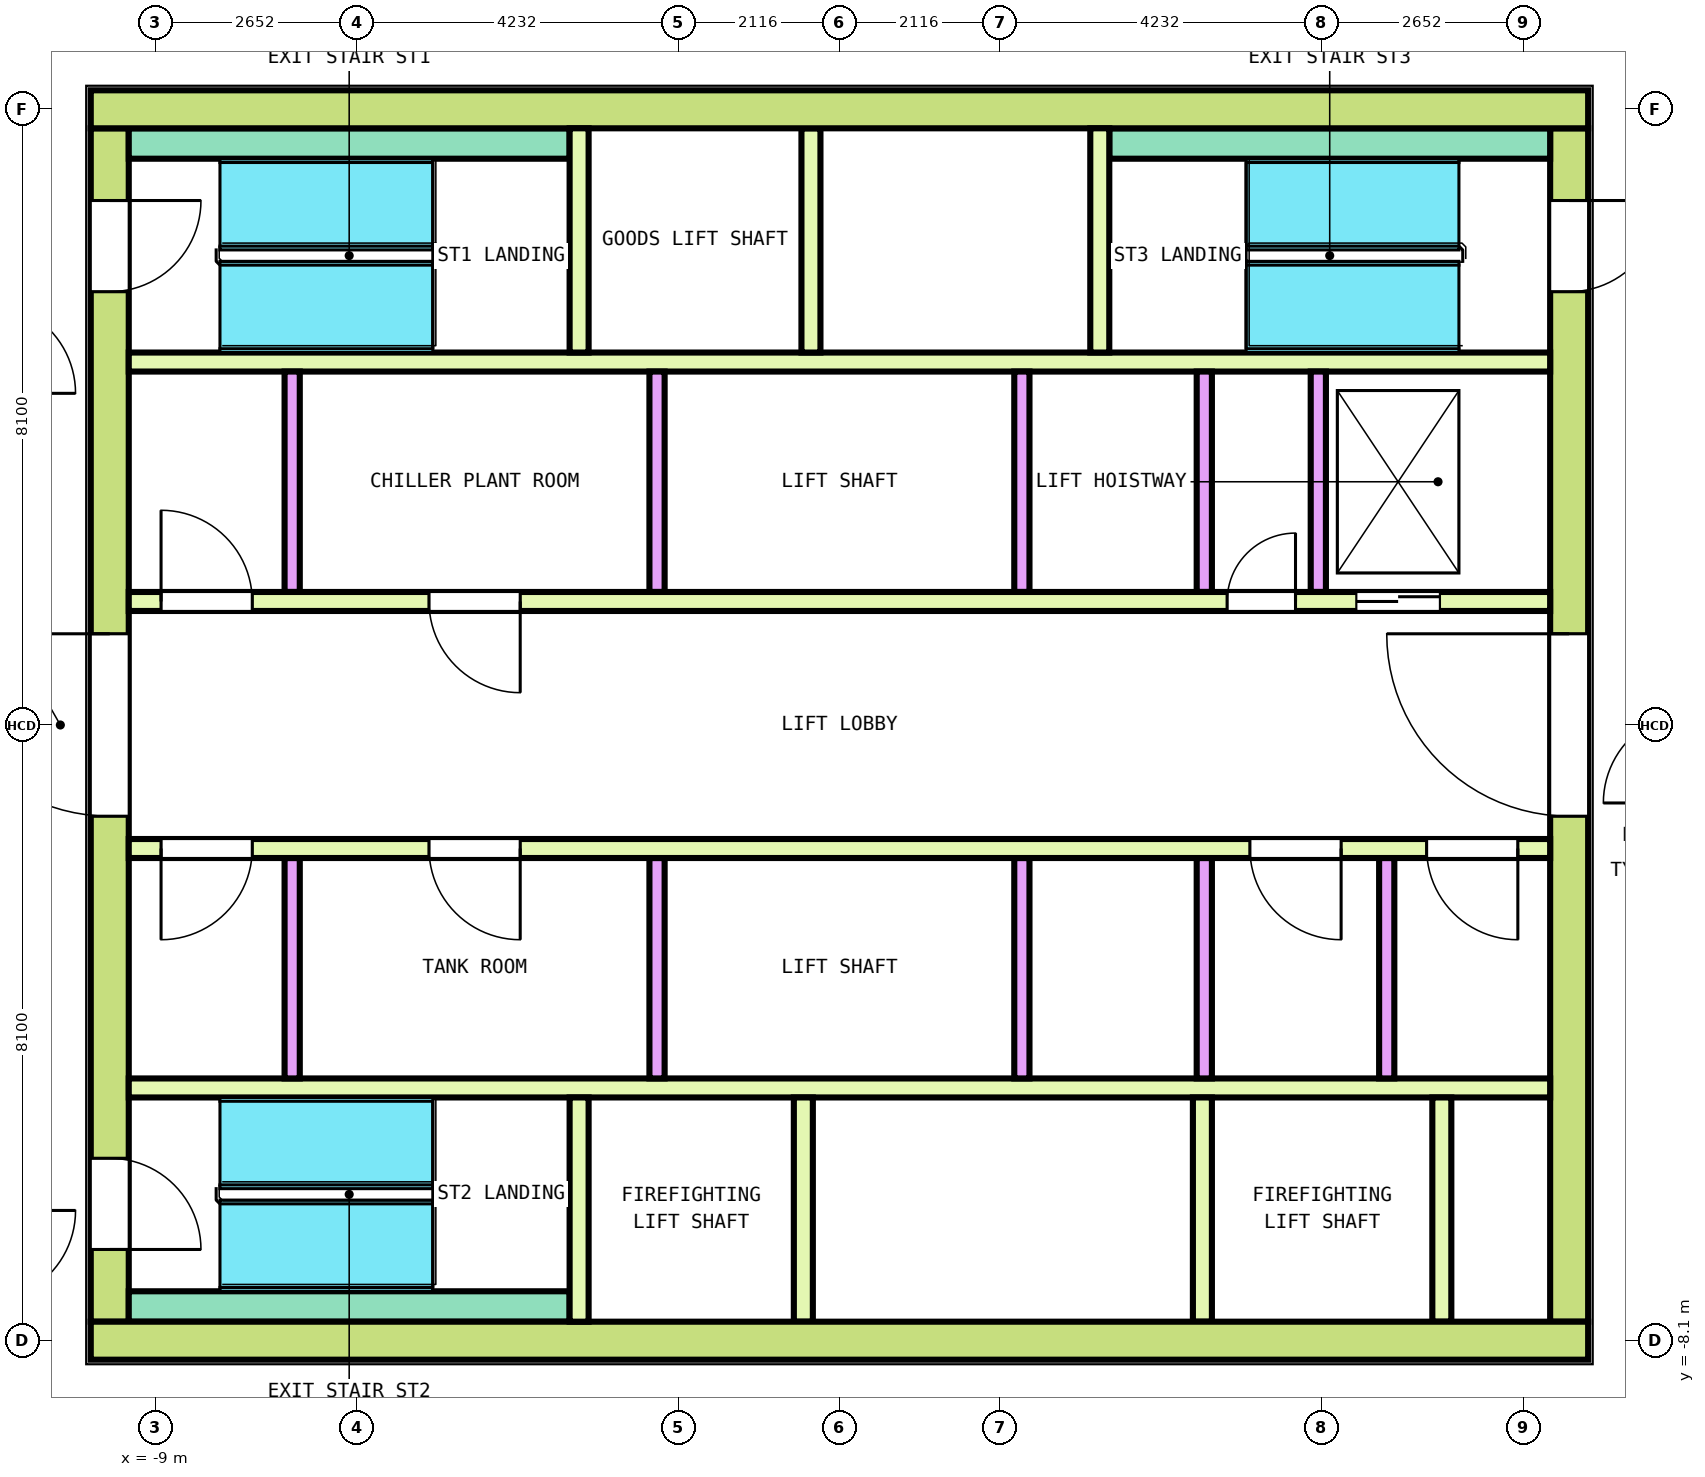
"""IFC4 building model, lengths in metres.
Left out: names, types, materials, properties, quantities, classifications, styles, units other than length and angle.
Written with IfcOpenShell. Run it as: python <this file> out.ifc"""

import sys

from ifc_helpers import new_model, si_unit, direction, frame, frame_2d, origin, place, context, subcontext, project, spatial, rectangle, extrude, element, fill, save


model = new_model("IFC4")
c1 = context("Model", 3, precision=1e-05, world=origin(), true_north=direction((0.0, 1.0)))
c2 = subcontext(c1, "Body", "Model", "MODEL_VIEW")
j1 = project(units=[si_unit("LENGTHUNIT", "METRE"), si_unit("PLANEANGLEUNIT", "RADIAN")], contexts=[c1])
p1 = place(None, origin())
s1 = spatial("IfcSite", under=j1, at=p1, CompositionType="ELEMENT")
p2 = place(p1, origin())
s2 = spatial("IfcBuilding", under=s1, at=p2, CompositionType="ELEMENT")
p3 = place(p2, frame((0.0, 0.0, 344.6)))
s3 = spatial("IfcBuildingStorey", under=s2, at=p3, CompositionType="ELEMENT", Elevation=344.6)
for number, where, z_axis, x_axis in (
    (1, (-9.85, 8.1, 0.0), (0.0, 0.0, 1.0), (1.0, 0.0, 0.0)),
    (2, (-9.85, -8.1, 0.0), (0.0, 0.0, 1.0), (1.0, 0.0, 0.0)),
):
    element("IfcWall", number, at=place(p3, frame(where, z_axis=z_axis, x_axis=x_axis)), inside=s3, PredefinedType="SHEAR", context=c2, shape_type="SweptSolid", body=[
        extrude(rectangle(XDim=19.7, YDim=0.5, at=frame_2d((9.85, 0.0))), origin(), (0.0, 0.0, 1.0), 3.8),
    ])
p4 = place(p3, frame((-9.6, -7.85, 0.0), z_axis=(0.0, 0.0, 1.0), x_axis=(0.0, 1.0, 0.0)))
e3 = element("IfcWall", 3, at=p4, inside=s3, PredefinedType="SHEAR", context=c2, shape_type="SweptSolid", body=[
    extrude(rectangle(XDim=15.7, YDim=0.5, at=frame_2d((7.85, 0.0))), origin(), (0.0, 0.0, 1.0), 3.8),
])
p5 = place(p4, frame((6.65, 0.0, 0.0)))
e4 = element("IfcOpeningElement", 4, at=p5, cuts=e3, PredefinedType="OPENING", context=c2, shape_type="SweptSolid", body=[
    extrude(rectangle(XDim=2.4, YDim=2.1, at=frame_2d((1.2, 1.05))), frame((0.0, 0.26, 0.0), z_axis=(0.0, -1.0, 0.0), x_axis=(1.0, 0.0, 0.0)), (0.0, 0.0, 1.0), 0.52),
])
p6 = place(p4, frame((13.55, 0.0, 0.0)))
e5 = element("IfcOpeningElement", 5, at=p6, cuts=e3, PredefinedType="OPENING", context=c2, shape_type="SweptSolid", body=[
    extrude(rectangle(XDim=1.2, YDim=2.1, at=frame_2d((0.6, 1.05))), frame((0.0, 0.26, 0.0), z_axis=(0.0, -1.0, 0.0), x_axis=(1.0, 0.0, 0.0)), (0.0, 0.0, 1.0), 0.52),
])
p7 = place(p4, frame((0.95, 0.0, 0.0)))
e6 = element("IfcOpeningElement", 6, at=p7, cuts=e3, PredefinedType="OPENING", context=c2, shape_type="SweptSolid", body=[
    extrude(rectangle(XDim=1.2, YDim=2.1, at=frame_2d((0.6, 1.05))), frame((0.0, 0.26, 0.0), z_axis=(0.0, -1.0, 0.0), x_axis=(1.0, 0.0, 0.0)), (0.0, 0.0, 1.0), 0.52),
])
p8 = place(p3, frame((9.6, -7.85, 0.0), z_axis=(0.0, 0.0, 1.0), x_axis=(0.0, 1.0, 0.0)))
e7 = element("IfcWall", 7, at=p8, inside=s3, PredefinedType="SHEAR", context=c2, shape_type="SweptSolid", body=[
    extrude(rectangle(XDim=15.7, YDim=0.5, at=frame_2d((7.85, 0.0))), origin(), (0.0, 0.0, 1.0), 3.8),
])
p9 = place(p8, frame((6.65, 0.0, 0.0)))
e8 = element("IfcOpeningElement", 8, at=p9, cuts=e7, PredefinedType="OPENING", context=c2, shape_type="SweptSolid", body=[
    extrude(rectangle(XDim=2.4, YDim=2.1, at=frame_2d((1.2, 1.05))), frame((0.0, 0.26, 0.0), z_axis=(0.0, -1.0, 0.0), x_axis=(1.0, 0.0, 0.0)), (0.0, 0.0, 1.0), 0.52),
])
p10 = place(p8, frame((13.55, 0.0, 0.0)))
e9 = element("IfcOpeningElement", 9, at=p10, cuts=e7, PredefinedType="OPENING", context=c2, shape_type="SweptSolid", body=[
    extrude(rectangle(XDim=1.2, YDim=2.1, at=frame_2d((0.6, 1.05))), frame((0.0, 0.26, 0.0), z_axis=(0.0, -1.0, 0.0), x_axis=(1.0, 0.0, 0.0)), (0.0, 0.0, 1.0), 0.52),
])
p11 = place(p3, frame((-9.35, 1.625, 0.0), z_axis=(0.0, 0.0, 1.0), x_axis=(1.0, 0.0, 0.0)))
e10 = element("IfcWall", 10, at=p11, inside=s3, PredefinedType="SOLIDWALL", context=c2, shape_type="SweptSolid", body=[
    extrude(rectangle(XDim=18.7, YDim=0.25, at=frame_2d((9.35, 0.0))), origin(), (0.0, 0.0, 1.0), 3.8),
])
p12 = place(p11, frame((16.15, 0.0, 0.0)))
e11 = element("IfcOpeningElement", 11, at=p12, cuts=e10, PredefinedType="OPENING", context=c2, shape_type="SweptSolid", body=[
    extrude(rectangle(XDim=1.1, YDim=2.1, at=frame_2d((0.55, 1.05))), frame((0.0, 0.135, 0.0), z_axis=(0.0, -1.0, 0.0), x_axis=(1.0, 0.0, 0.0)), (0.0, 0.0, 1.0), 0.27),
])
p13 = place(p11, frame((0.425, 0.0, 0.0)))
e12 = element("IfcOpeningElement", 12, at=p13, cuts=e10, PredefinedType="OPENING", context=c2, shape_type="SweptSolid", body=[
    extrude(rectangle(XDim=1.2, YDim=2.1, at=frame_2d((0.6, 1.05))), frame((0.0, 0.135, 0.0), z_axis=(0.0, -1.0, 0.0), x_axis=(1.0, 0.0, 0.0)), (0.0, 0.0, 1.0), 0.27),
])
p14 = place(p11, frame((3.95, 0.0, 0.0)))
e13 = element("IfcOpeningElement", 13, at=p14, cuts=e10, PredefinedType="OPENING", context=c2, shape_type="SweptSolid", body=[
    extrude(rectangle(XDim=1.2, YDim=2.1, at=frame_2d((0.6, 1.05))), frame((0.0, 0.135, 0.0), z_axis=(0.0, -1.0, 0.0), x_axis=(1.0, 0.0, 0.0)), (0.0, 0.0, 1.0), 0.27),
])
p15 = place(p11, frame((14.45, 0.0, 0.0)))
e14 = element("IfcOpeningElement", 14, at=p15, cuts=e10, PredefinedType="OPENING", context=c2, shape_type="SweptSolid", body=[
    extrude(rectangle(XDim=0.9, YDim=2.1, at=frame_2d((0.45, 1.05))), frame((0.0, 0.135, 0.0), z_axis=(0.0, -1.0, 0.0), x_axis=(1.0, 0.0, 0.0)), (0.0, 0.0, 1.0), 0.27),
])
p16 = place(p3, frame((-9.35, 4.775, 0.0), z_axis=(0.0, 0.0, 1.0), x_axis=(1.0, 0.0, 0.0)))
e15 = element("IfcWall", 15, at=p16, inside=s3, PredefinedType="SOLIDWALL", context=c2, shape_type="SweptSolid", body=[
    extrude(rectangle(XDim=18.7, YDim=0.25, at=frame_2d((9.35, 0.0))), origin(), (0.0, 0.0, 1.0), 3.8),
])
for number, where, z_axis, x_axis in (
    (16, (-7.2, 1.75, 0.0), (0.0, 0.0, 1.0), (0.0, 1.0, 0.0)),
    (17, (-2.4, 1.75, 0.0), (0.0, 0.0, 1.0), (0.0, 1.0, 0.0)),
    (18, (2.4, 1.75, 0.0), (0.0, 0.0, 1.0), (0.0, 1.0, 0.0)),
    (19, (4.8, 1.75, 0.0), (0.0, 0.0, 1.0), (0.0, 1.0, 0.0)),
    (20, (6.3, 1.75, 0.0), (0.0, 0.0, 1.0), (0.0, 1.0, 0.0)),
):
    element("IfcWall", number, at=place(p3, frame(where, z_axis=z_axis, x_axis=x_axis)), inside=s3, PredefinedType="SOLIDWALL", context=c2, shape_type="SweptSolid", body=[
        extrude(rectangle(XDim=2.9, YDim=0.2, at=frame_2d((1.45, 0.0))), origin(), (0.0, 0.0, 1.0), 3.8),
    ])
p17 = place(p3, frame((-9.35, -1.625, 0.0), z_axis=(0.0, 0.0, 1.0), x_axis=(1.0, 0.0, 0.0)))
e21 = element("IfcWall", 21, at=p17, inside=s3, PredefinedType="SOLIDWALL", context=c2, shape_type="SweptSolid", body=[
    extrude(rectangle(XDim=18.7, YDim=0.25, at=frame_2d((9.35, 0.0))), origin(), (0.0, 0.0, 1.0), 3.8),
])
p18 = place(p17, frame((0.425, 0.0, 0.0)))
e22 = element("IfcOpeningElement", 22, at=p18, cuts=e21, PredefinedType="OPENING", context=c2, shape_type="SweptSolid", body=[
    extrude(rectangle(XDim=1.2, YDim=2.1, at=frame_2d((0.6, 1.05))), frame((0.0, 0.135, 0.0), z_axis=(0.0, -1.0, 0.0), x_axis=(1.0, 0.0, 0.0)), (0.0, 0.0, 1.0), 0.27),
])
p19 = place(p17, frame((3.95, 0.0, 0.0)))
e23 = element("IfcOpeningElement", 23, at=p19, cuts=e21, PredefinedType="OPENING", context=c2, shape_type="SweptSolid", body=[
    extrude(rectangle(XDim=1.2, YDim=2.1, at=frame_2d((0.6, 1.05))), frame((0.0, 0.135, 0.0), z_axis=(0.0, -1.0, 0.0), x_axis=(1.0, 0.0, 0.0)), (0.0, 0.0, 1.0), 0.27),
])
p20 = place(p17, frame((14.75, 0.0, 0.0)))
e24 = element("IfcOpeningElement", 24, at=p20, cuts=e21, PredefinedType="OPENING", context=c2, shape_type="SweptSolid", body=[
    extrude(rectangle(XDim=1.2, YDim=2.1, at=frame_2d((0.6, 1.05))), frame((0.0, 0.135, 0.0), z_axis=(0.0, -1.0, 0.0), x_axis=(1.0, 0.0, 0.0)), (0.0, 0.0, 1.0), 0.27),
])
p21 = place(p17, frame((17.075, 0.0, 0.0)))
e25 = element("IfcOpeningElement", 25, at=p21, cuts=e21, PredefinedType="OPENING", context=c2, shape_type="SweptSolid", body=[
    extrude(rectangle(XDim=1.2, YDim=2.1, at=frame_2d((0.6, 1.05))), frame((0.0, 0.135, 0.0), z_axis=(0.0, -1.0, 0.0), x_axis=(1.0, 0.0, 0.0)), (0.0, 0.0, 1.0), 0.27),
])
p22 = place(p3, frame((-9.35, -4.775, 0.0), z_axis=(0.0, 0.0, 1.0), x_axis=(1.0, 0.0, 0.0)))
e26 = element("IfcWall", 26, at=p22, inside=s3, PredefinedType="SOLIDWALL", context=c2, shape_type="SweptSolid", body=[
    extrude(rectangle(XDim=18.7, YDim=0.25, at=frame_2d((9.35, 0.0))), origin(), (0.0, 0.0, 1.0), 3.8),
])
for number, where, z_axis, x_axis in (
    (27, (-7.2, -4.65, 0.0), (0.0, 0.0, 1.0), (0.0, 1.0, 0.0)),
    (28, (-2.4, -4.65, 0.0), (0.0, 0.0, 1.0), (0.0, 1.0, 0.0)),
    (29, (2.4, -4.65, 0.0), (0.0, 0.0, 1.0), (0.0, 1.0, 0.0)),
    (30, (4.8, -4.65, 0.0), (0.0, 0.0, 1.0), (0.0, 1.0, 0.0)),
    (31, (7.2, -4.65, 0.0), (0.0, 0.0, 1.0), (0.0, 1.0, 0.0)),
):
    element("IfcWall", number, at=place(p3, frame(where, z_axis=z_axis, x_axis=x_axis)), inside=s3, PredefinedType="SOLIDWALL", context=c2, shape_type="SweptSolid", body=[
        extrude(rectangle(XDim=2.9, YDim=0.2, at=frame_2d((1.45, 0.0))), origin(), (0.0, 0.0, 1.0), 3.8),
    ])
for number, where, z_axis, x_axis in (
    (32, (-9.35, 7.65, 0.0), (0.0, 0.0, 1.0), (1.0, 0.0, 0.0)),
    (33, (3.55, 7.65, 0.0), (0.0, 0.0, 1.0), (1.0, 0.0, 0.0)),
):
    element("IfcWall", number, at=place(p3, frame(where, z_axis=z_axis, x_axis=x_axis)), inside=s3, PredefinedType="SOLIDWALL", context=c2, shape_type="SweptSolid", body=[
        extrude(rectangle(XDim=5.8, YDim=0.4, at=frame_2d((2.9, 0.0))), origin(), (0.0, 0.0, 1.0), 3.8),
    ])
for number, where, z_axis, x_axis in (
    (34, (-3.425, 4.9, 0.0), (0.0, 0.0, 1.0), (0.0, 1.0, 0.0)),
    (35, (-0.375, 4.9, 0.0), (0.0, 0.0, 1.0), (0.0, 1.0, 0.0)),
    (36, (3.425, 4.9, 0.0), (0.0, 0.0, 1.0), (0.0, 1.0, 0.0)),
):
    element("IfcWall", number, at=place(p3, frame(where, z_axis=z_axis, x_axis=x_axis)), inside=s3, PredefinedType="SOLIDWALL", context=c2, shape_type="SweptSolid", body=[
        extrude(rectangle(XDim=2.95, YDim=0.25, at=frame_2d((1.475, 0.0))), origin(), (0.0, 0.0, 1.0), 3.8),
    ])
p23 = place(p3, frame((-9.35, -7.65, 0.0), z_axis=(0.0, 0.0, 1.0), x_axis=(1.0, 0.0, 0.0)))
e37 = element("IfcWall", 37, at=p23, inside=s3, PredefinedType="SOLIDWALL", context=c2, shape_type="SweptSolid", body=[
    extrude(rectangle(XDim=5.8, YDim=0.4, at=frame_2d((2.9, 0.0))), origin(), (0.0, 0.0, 1.0), 3.8),
])
for number, where, z_axis, x_axis in (
    (38, (-3.425, -7.85, 0.0), (0.0, 0.0, 1.0), (0.0, 1.0, 0.0)),
    (39, (-0.475, -7.85, 0.0), (0.0, 0.0, 1.0), (0.0, 1.0, 0.0)),
    (40, (4.775, -7.85, 0.0), (0.0, 0.0, 1.0), (0.0, 1.0, 0.0)),
    (41, (7.925, -7.85, 0.0), (0.0, 0.0, 1.0), (0.0, 1.0, 0.0)),
):
    element("IfcWall", number, at=place(p3, frame(where, z_axis=z_axis, x_axis=x_axis)), inside=s3, PredefinedType="SOLIDWALL", context=c2, shape_type="SweptSolid", body=[
        extrude(rectangle(XDim=2.95, YDim=0.25, at=frame_2d((1.475, 0.0))), origin(), (0.0, 0.0, 1.0), 3.8),
    ])
p24 = place(p12, origin())
e42 = element("IfcDoor", 42, at=p24, inside=s3, OperationType="DOUBLE_DOOR_SLIDING", PredefinedType="DOOR", context=c2, shape_type="SweptSolid", body=[
    extrude(rectangle(XDim=1.1, YDim=2.1, at=frame_2d((0.55, 1.05))), frame((0.0, 0.075, 0.0), z_axis=(0.0, -1.0, 0.0), x_axis=(1.0, 0.0, 0.0)), (0.0, 0.0, 1.0), 0.15),
])
fill(e11, e42)
p25 = place(p5, origin())
e43 = element("IfcDoor", 43, at=p25, inside=s3, OperationType="DOUBLE_DOOR_SINGLE_SWING", PredefinedType="DOOR", context=c2, shape_type="SweptSolid", body=[
    extrude(rectangle(XDim=2.4, YDim=2.1, at=frame_2d((1.2, 1.05))), frame((0.0, 0.2, 0.0), z_axis=(0.0, -1.0, 0.0), x_axis=(1.0, 0.0, 0.0)), (0.0, 0.0, 1.0), 0.4),
])
fill(e4, e43)
p26 = place(p9, origin())
e44 = element("IfcDoor", 44, at=p26, inside=s3, OperationType="DOUBLE_DOOR_SINGLE_SWING", PredefinedType="DOOR", context=c2, shape_type="SweptSolid", body=[
    extrude(rectangle(XDim=2.4, YDim=2.1, at=frame_2d((1.2, 1.05))), frame((0.0, 0.2, 0.0), z_axis=(0.0, -1.0, 0.0), x_axis=(1.0, 0.0, 0.0)), (0.0, 0.0, 1.0), 0.4),
])
fill(e8, e44)
p27 = place(p6, origin())
e45 = element("IfcDoor", 45, at=p27, inside=s3, OperationType="SINGLE_SWING_LEFT", PredefinedType="DOOR", context=c2, shape_type="SweptSolid", body=[
    extrude(rectangle(XDim=1.2, YDim=2.1, at=frame_2d((0.6, 1.05))), frame((0.0, 0.2, 0.0), z_axis=(0.0, -1.0, 0.0), x_axis=(1.0, 0.0, 0.0)), (0.0, 0.0, 1.0), 0.4),
])
fill(e5, e45)
p28 = place(p7, origin())
e46 = element("IfcDoor", 46, at=p28, inside=s3, OperationType="SINGLE_SWING_RIGHT", PredefinedType="DOOR", context=c2, shape_type="SweptSolid", body=[
    extrude(rectangle(XDim=1.2, YDim=2.1, at=frame_2d((0.6, 1.05))), frame((0.0, 0.2, 0.0), z_axis=(0.0, -1.0, 0.0), x_axis=(1.0, 0.0, 0.0)), (0.0, 0.0, 1.0), 0.4),
])
fill(e6, e46)
p29 = place(p10, origin())
e47 = element("IfcDoor", 47, at=p29, inside=s3, OperationType="SINGLE_SWING_LEFT", PredefinedType="DOOR", context=c2, shape_type="SweptSolid", body=[
    extrude(rectangle(XDim=1.2, YDim=2.1, at=frame_2d((0.6, 1.05))), frame((0.0, 0.2, 0.0), z_axis=(0.0, -1.0, 0.0), x_axis=(1.0, 0.0, 0.0)), (0.0, 0.0, 1.0), 0.4),
])
fill(e9, e47)
p30 = place(p13, origin())
e48 = element("IfcDoor", 48, at=p30, inside=s3, OperationType="SINGLE_SWING_RIGHT", PredefinedType="DOOR", context=c2, shape_type="SweptSolid", body=[
    extrude(rectangle(XDim=1.2, YDim=2.1, at=frame_2d((0.6, 1.05))), frame((0.0, 0.075, 0.0), z_axis=(0.0, -1.0, 0.0), x_axis=(1.0, 0.0, 0.0)), (0.0, 0.0, 1.0), 0.15),
])
fill(e12, e48)
p31 = place(p14, origin())
e49 = element("IfcDoor", 49, at=p31, inside=s3, OperationType="SINGLE_SWING_LEFT", PredefinedType="DOOR", context=c2, shape_type="SweptSolid", body=[
    extrude(rectangle(XDim=1.2, YDim=2.1, at=frame_2d((0.6, 1.05))), frame((0.0, 0.075, 0.0), z_axis=(0.0, -1.0, 0.0), x_axis=(1.0, 0.0, 0.0)), (0.0, 0.0, 1.0), 0.15),
])
fill(e13, e49)
p32 = place(p15, origin())
e50 = element("IfcDoor", 50, at=p32, inside=s3, OperationType="SINGLE_SWING_RIGHT", PredefinedType="DOOR", context=c2, shape_type="SweptSolid", body=[
    extrude(rectangle(XDim=0.9, YDim=2.1, at=frame_2d((0.45, 1.05))), frame((0.0, 0.075, 0.0), z_axis=(0.0, -1.0, 0.0), x_axis=(1.0, 0.0, 0.0)), (0.0, 0.0, 1.0), 0.15),
])
fill(e14, e50)
p33 = place(p18, origin())
e51 = element("IfcDoor", 51, at=p33, inside=s3, OperationType="SINGLE_SWING_LEFT", PredefinedType="DOOR", context=c2, shape_type="SweptSolid", body=[
    extrude(rectangle(XDim=1.2, YDim=2.1, at=frame_2d((0.6, 1.05))), frame((0.0, 0.075, 0.0), z_axis=(0.0, -1.0, 0.0), x_axis=(1.0, 0.0, 0.0)), (0.0, 0.0, 1.0), 0.15),
])
fill(e22, e51)
p34 = place(p19, origin())
e52 = element("IfcDoor", 52, at=p34, inside=s3, OperationType="SINGLE_SWING_RIGHT", PredefinedType="DOOR", context=c2, shape_type="SweptSolid", body=[
    extrude(rectangle(XDim=1.2, YDim=2.1, at=frame_2d((0.6, 1.05))), frame((0.0, 0.075, 0.0), z_axis=(0.0, -1.0, 0.0), x_axis=(1.0, 0.0, 0.0)), (0.0, 0.0, 1.0), 0.15),
])
fill(e23, e52)
p35 = place(p20, origin())
e53 = element("IfcDoor", 53, at=p35, inside=s3, OperationType="SINGLE_SWING_LEFT", PredefinedType="DOOR", context=c2, shape_type="SweptSolid", body=[
    extrude(rectangle(XDim=1.2, YDim=2.1, at=frame_2d((0.6, 1.05))), frame((0.0, 0.075, 0.0), z_axis=(0.0, -1.0, 0.0), x_axis=(1.0, 0.0, 0.0)), (0.0, 0.0, 1.0), 0.15),
])
fill(e24, e53)
p36 = place(p21, origin())
e54 = element("IfcDoor", 54, at=p36, inside=s3, OperationType="SINGLE_SWING_RIGHT", PredefinedType="DOOR", context=c2, shape_type="SweptSolid", body=[
    extrude(rectangle(XDim=1.2, YDim=2.1, at=frame_2d((0.6, 1.05))), frame((0.0, 0.075, 0.0), z_axis=(0.0, -1.0, 0.0), x_axis=(1.0, 0.0, 0.0)), (0.0, 0.0, 1.0), 0.15),
])
fill(e25, e54)
save(model, sys.argv[1])
